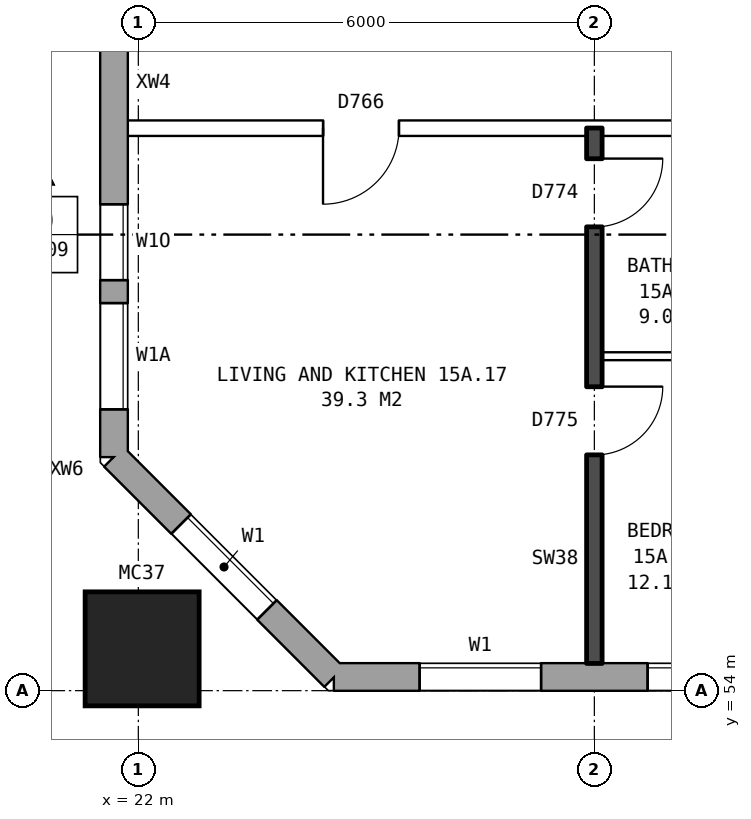
"""IFC4 building model, lengths in metres.
Left out: names, types, materials, properties, quantities, classifications, styles, units other than length and angle.
Written with IfcOpenShell. Run it as: python <this file> out.ifc"""

import sys

from ifc_helpers import new_model, si_unit, direction, frame, frame_2d, origin, origin_2d, place, context, subcontext, project, spatial, rectangle, hollow_rectangle, extrude, element, fill, save


model = new_model("IFC4")
c1 = context("Model", 3, precision=1e-05, world=origin(), true_north=direction((0.0, 1.0)))
c2 = subcontext(c1, "Body", "Model", "MODEL_VIEW")
j1 = project(units=[si_unit("LENGTHUNIT", "METRE"), si_unit("PLANEANGLEUNIT", "RADIAN")], contexts=[c1])
p1 = place(None, origin())
s1 = spatial("IfcSite", under=j1, at=p1, CompositionType="ELEMENT")
p2 = place(p1, origin())
s2 = spatial("IfcBuilding", under=s1, at=p2, CompositionType="ELEMENT")
p3 = place(p2, frame((0.0, 0.0, 56.7)))
s3 = spatial("IfcBuildingStorey", under=s2, at=p3, CompositionType="ELEMENT", Elevation=56.7)
p4 = place(p3, frame((22.05, 54.55, 0.0), z_axis=(0.0, 0.0, 1.0), x_axis=(1.0, 0.0, 0.0)))
e1 = element("IfcColumn", 1, at=p4, inside=s3, PredefinedType="COLUMN", context=c2, shape_type="SweptSolid", body=[
    extrude(hollow_rectangle(XDim=1.5, YDim=1.5, WallThickness=0.08, at=origin_2d()), origin(), (0.0, 0.0, 1.0), 3.1),
])
p5 = place(p3, frame((21.68, 57.075, 0.0), z_axis=(0.0, 0.0, 1.0), x_axis=(0.707106781187, -0.707106781187, 0.0)))
e2 = element("IfcWall", 2, at=p5, inside=s3, PredefinedType="STANDARD", context=c2, shape_type="SweptSolid", body=[
    extrude(rectangle(XDim=4.094, YDim=0.36, at=frame_2d((2.047, 0.0))), origin(), (0.0, 0.0, 1.0), 2.85),
])
p6 = place(p5, frame((1.247, 0.0, 0.8)))
e3 = element("IfcOpeningElement", 3, at=p6, cuts=e2, PredefinedType="OPENING", context=c2, shape_type="SweptSolid", body=[
    extrude(rectangle(XDim=1.6, YDim=1.8, at=frame_2d((0.8, 0.9))), frame((0.0, 0.19, 0.0), z_axis=(0.0, -1.0, 0.0), x_axis=(1.0, 0.0, 0.0)), (0.0, 0.0, 1.0), 0.38),
])
p7 = place(p3, frame((24.575, 54.18, 0.0), z_axis=(0.0, 0.0, 1.0), x_axis=(1.0, 0.0, 0.0)))
e4 = element("IfcWall", 4, at=p7, inside=s3, PredefinedType="STANDARD", context=c2, shape_type="SweptSolid", body=[
    extrude(rectangle(XDim=48.351, YDim=0.36, at=frame_2d((24.175, 0.0))), origin(), (0.0, 0.0, 1.0), 2.85),
])
p8 = place(p7, frame((1.125, 0.0, 0.8)))
e5 = element("IfcOpeningElement", 5, at=p8, cuts=e4, PredefinedType="OPENING", context=c2, shape_type="SweptSolid", body=[
    extrude(rectangle(XDim=1.6, YDim=1.8, at=frame_2d((0.8, 0.9))), frame((0.0, 0.19, 0.0), z_axis=(0.0, -1.0, 0.0), x_axis=(1.0, 0.0, 0.0)), (0.0, 0.0, 1.0), 0.38),
])
p9 = place(p7, frame((4.125, 0.0, 0.8)))
e6 = element("IfcOpeningElement", 6, at=p9, cuts=e4, PredefinedType="OPENING", context=c2, shape_type="SweptSolid", body=[
    extrude(rectangle(XDim=1.6, YDim=1.8, at=frame_2d((0.8, 0.9))), frame((0.0, 0.19, 0.0), z_axis=(0.0, -1.0, 0.0), x_axis=(1.0, 0.0, 0.0)), (0.0, 0.0, 1.0), 0.38),
])
p10 = place(p7, frame((7.125, 0.0, 0.8)))
e7 = element("IfcOpeningElement", 7, at=p10, cuts=e4, PredefinedType="OPENING", context=c2, shape_type="SweptSolid", body=[
    extrude(rectangle(XDim=1.6, YDim=1.8, at=frame_2d((0.8, 0.9))), frame((0.0, 0.19, 0.0), z_axis=(0.0, -1.0, 0.0), x_axis=(1.0, 0.0, 0.0)), (0.0, 0.0, 1.0), 0.38),
])
p11 = place(p7, frame((10.125, 0.0, 0.8)))
e8 = element("IfcOpeningElement", 8, at=p11, cuts=e4, PredefinedType="OPENING", context=c2, shape_type="SweptSolid", body=[
    extrude(rectangle(XDim=1.6, YDim=1.8, at=frame_2d((0.8, 0.9))), frame((0.0, 0.19, 0.0), z_axis=(0.0, -1.0, 0.0), x_axis=(1.0, 0.0, 0.0)), (0.0, 0.0, 1.0), 0.38),
])
p12 = place(p7, frame((13.125, 0.0, 0.8)))
e9 = element("IfcOpeningElement", 9, at=p12, cuts=e4, PredefinedType="OPENING", context=c2, shape_type="SweptSolid", body=[
    extrude(rectangle(XDim=1.6, YDim=1.8, at=frame_2d((0.8, 0.9))), frame((0.0, 0.19, 0.0), z_axis=(0.0, -1.0, 0.0), x_axis=(1.0, 0.0, 0.0)), (0.0, 0.0, 1.0), 0.38),
])
p13 = place(p7, frame((15.625, 0.0, 1.0)))
e10 = element("IfcOpeningElement", 10, at=p13, cuts=e4, PredefinedType="OPENING", context=c2, shape_type="SweptSolid", body=[
    extrude(rectangle(XDim=0.8, YDim=1.5, at=frame_2d((0.4, 0.75))), frame((0.0, 0.19, 0.0), z_axis=(0.0, -1.0, 0.0), x_axis=(1.0, 0.0, 0.0)), (0.0, 0.0, 1.0), 0.38),
])
p14 = place(p7, frame((16.725, 0.0, 1.6)))
e11 = element("IfcOpeningElement", 11, at=p14, cuts=e4, PredefinedType="OPENING", context=c2, shape_type="SweptSolid", body=[
    extrude(rectangle(XDim=0.6, YDim=0.9, at=frame_2d((0.3, 0.45))), frame((0.0, 0.19, 0.0), z_axis=(0.0, -1.0, 0.0), x_axis=(1.0, 0.0, 0.0)), (0.0, 0.0, 1.0), 0.38),
])
p15 = place(p7, frame((22.125, 0.0, 0.8)))
e12 = element("IfcOpeningElement", 12, at=p15, cuts=e4, PredefinedType="OPENING", context=c2, shape_type="SweptSolid", body=[
    extrude(rectangle(XDim=1.6, YDim=1.8, at=frame_2d((0.8, 0.9))), frame((0.0, 0.19, 0.0), z_axis=(0.0, -1.0, 0.0), x_axis=(1.0, 0.0, 0.0)), (0.0, 0.0, 1.0), 0.38),
])
p16 = place(p7, frame((25.125, 0.0, 0.8)))
e13 = element("IfcOpeningElement", 13, at=p16, cuts=e4, PredefinedType="OPENING", context=c2, shape_type="SweptSolid", body=[
    extrude(rectangle(XDim=1.6, YDim=1.8, at=frame_2d((0.8, 0.9))), frame((0.0, 0.19, 0.0), z_axis=(0.0, -1.0, 0.0), x_axis=(1.0, 0.0, 0.0)), (0.0, 0.0, 1.0), 0.38),
])
p17 = place(p7, frame((27.625, 0.0, 0.35)))
e14 = element("IfcOpeningElement", 14, at=p17, cuts=e4, PredefinedType="OPENING", context=c2, shape_type="SweptSolid", body=[
    extrude(rectangle(XDim=1.2, YDim=1.8, at=frame_2d((0.6, 0.9))), frame((0.0, 0.19, 0.0), z_axis=(0.0, -1.0, 0.0), x_axis=(1.0, 0.0, 0.0)), (0.0, 0.0, 1.0), 0.38),
])
p18 = place(p7, frame((30.875, 0.0, 1.7)))
e15 = element("IfcOpeningElement", 15, at=p18, cuts=e4, PredefinedType="OPENING", context=c2, shape_type="SweptSolid", body=[
    extrude(rectangle(XDim=1.0, YDim=0.9, at=frame_2d((0.5, 0.45))), frame((0.0, 0.19, 0.0), z_axis=(0.0, -1.0, 0.0), x_axis=(1.0, 0.0, 0.0)), (0.0, 0.0, 1.0), 0.38),
])
p19 = place(p7, frame((34.125, 0.0, 0.8)))
e16 = element("IfcOpeningElement", 16, at=p19, cuts=e4, PredefinedType="OPENING", context=c2, shape_type="SweptSolid", body=[
    extrude(rectangle(XDim=1.6, YDim=1.8, at=frame_2d((0.8, 0.9))), frame((0.0, 0.19, 0.0), z_axis=(0.0, -1.0, 0.0), x_axis=(1.0, 0.0, 0.0)), (0.0, 0.0, 1.0), 0.38),
])
p20 = place(p7, frame((37.125, 0.0, 0.8)))
e17 = element("IfcOpeningElement", 17, at=p20, cuts=e4, PredefinedType="OPENING", context=c2, shape_type="SweptSolid", body=[
    extrude(rectangle(XDim=1.6, YDim=1.8, at=frame_2d((0.8, 0.9))), frame((0.0, 0.19, 0.0), z_axis=(0.0, -1.0, 0.0), x_axis=(1.0, 0.0, 0.0)), (0.0, 0.0, 1.0), 0.38),
])
p21 = place(p7, frame((40.125, 0.0, 0.8)))
e18 = element("IfcOpeningElement", 18, at=p21, cuts=e4, PredefinedType="OPENING", context=c2, shape_type="SweptSolid", body=[
    extrude(rectangle(XDim=1.6, YDim=1.8, at=frame_2d((0.8, 0.9))), frame((0.0, 0.19, 0.0), z_axis=(0.0, -1.0, 0.0), x_axis=(1.0, 0.0, 0.0)), (0.0, 0.0, 1.0), 0.38),
])
p22 = place(p7, frame((43.125, 0.0, 0.8)))
e19 = element("IfcOpeningElement", 19, at=p22, cuts=e4, PredefinedType="OPENING", context=c2, shape_type="SweptSolid", body=[
    extrude(rectangle(XDim=1.6, YDim=1.8, at=frame_2d((0.8, 0.9))), frame((0.0, 0.19, 0.0), z_axis=(0.0, -1.0, 0.0), x_axis=(1.0, 0.0, 0.0)), (0.0, 0.0, 1.0), 0.38),
])
p23 = place(p7, frame((46.125, 0.0, 0.8)))
e20 = element("IfcOpeningElement", 20, at=p23, cuts=e4, PredefinedType="OPENING", context=c2, shape_type="SweptSolid", body=[
    extrude(rectangle(XDim=1.6, YDim=1.8, at=frame_2d((0.8, 0.9))), frame((0.0, 0.19, 0.0), z_axis=(0.0, -1.0, 0.0), x_axis=(1.0, 0.0, 0.0)), (0.0, 0.0, 1.0), 0.38),
])
p24 = place(p7, frame((18.875, 0.0, 0.8)))
e21 = element("IfcOpeningElement", 21, at=p24, cuts=e4, PredefinedType="OPENING", context=c2, shape_type="SweptSolid", body=[
    extrude(rectangle(XDim=1.0, YDim=0.9, at=frame_2d((0.5, 0.45))), frame((0.0, 0.19, 0.0), z_axis=(0.0, -1.0, 0.0), x_axis=(1.0, 0.0, 0.0)), (0.0, 0.0, 1.0), 0.38),
])
p25 = place(p7, frame((20.175, 0.0, 0.8)))
e22 = element("IfcOpeningElement", 22, at=p25, cuts=e4, PredefinedType="OPENING", context=c2, shape_type="SweptSolid", body=[
    extrude(rectangle(XDim=1.0, YDim=1.8, at=frame_2d((0.5, 0.9))), frame((0.0, 0.19, 0.0), z_axis=(0.0, -1.0, 0.0), x_axis=(1.0, 0.0, 0.0)), (0.0, 0.0, 1.0), 0.38),
])
p26 = place(p7, frame((29.125, 0.0, 0.35)))
e23 = element("IfcOpeningElement", 23, at=p26, cuts=e4, PredefinedType="OPENING", context=c2, shape_type="SweptSolid", body=[
    extrude(rectangle(XDim=1.0, YDim=0.9, at=frame_2d((0.5, 0.45))), frame((0.0, 0.19, 0.0), z_axis=(0.0, -1.0, 0.0), x_axis=(1.0, 0.0, 0.0)), (0.0, 0.0, 1.0), 0.38),
])
p27 = place(p7, frame((32.225, 0.0, 0.8)))
e24 = element("IfcOpeningElement", 24, at=p27, cuts=e4, PredefinedType="OPENING", context=c2, shape_type="SweptSolid", body=[
    extrude(rectangle(XDim=1.0, YDim=1.8, at=frame_2d((0.5, 0.9))), frame((0.0, 0.19, 0.0), z_axis=(0.0, -1.0, 0.0), x_axis=(1.0, 0.0, 0.0)), (0.0, 0.0, 1.0), 0.38),
])
p28 = place(p3, frame((21.68, 82.925, 0.0), z_axis=(0.0, 0.0, 1.0), x_axis=(0.0, -1.0, 0.0)))
e25 = element("IfcWall", 25, at=p28, inside=s3, PredefinedType="STANDARD", context=c2, shape_type="SweptSolid", body=[
    extrude(rectangle(XDim=25.851, YDim=0.36, at=frame_2d((12.925, 0.0))), origin(), (0.0, 0.0, 1.0), 2.85),
])
p29 = place(p28, frame((0.725, 0.0, 0.8)))
e26 = element("IfcOpeningElement", 26, at=p29, cuts=e25, PredefinedType="OPENING", context=c2, shape_type="SweptSolid", body=[
    extrude(rectangle(XDim=1.6, YDim=1.8, at=frame_2d((0.8, 0.9))), frame((0.0, 0.19, 0.0), z_axis=(0.0, -1.0, 0.0), x_axis=(1.0, 0.0, 0.0)), (0.0, 0.0, 1.0), 0.38),
])
p30 = place(p28, frame((5.525, 0.0, 1.4)))
e27 = element("IfcOpeningElement", 27, at=p30, cuts=e25, PredefinedType="OPENING", context=c2, shape_type="SweptSolid", body=[
    extrude(rectangle(XDim=1.6, YDim=1.2, at=frame_2d((0.8, 0.6))), frame((0.0, 0.19, 0.0), z_axis=(0.0, -1.0, 0.0), x_axis=(1.0, 0.0, 0.0)), (0.0, 0.0, 1.0), 0.38),
])
p31 = place(p28, frame((7.625, 0.0, 0.8)))
e28 = element("IfcOpeningElement", 28, at=p31, cuts=e25, PredefinedType="OPENING", context=c2, shape_type="SweptSolid", body=[
    extrude(rectangle(XDim=1.6, YDim=1.8, at=frame_2d((0.8, 0.9))), frame((0.0, 0.19, 0.0), z_axis=(0.0, -1.0, 0.0), x_axis=(1.0, 0.0, 0.0)), (0.0, 0.0, 1.0), 0.38),
])
p32 = place(p28, frame((10.625, 0.0, 0.8)))
e29 = element("IfcOpeningElement", 29, at=p32, cuts=e25, PredefinedType="OPENING", context=c2, shape_type="SweptSolid", body=[
    extrude(rectangle(XDim=1.6, YDim=1.8, at=frame_2d((0.8, 0.9))), frame((0.0, 0.19, 0.0), z_axis=(0.0, -1.0, 0.0), x_axis=(1.0, 0.0, 0.0)), (0.0, 0.0, 1.0), 0.38),
])
p33 = place(p28, frame((13.625, 0.0, 0.8)))
e30 = element("IfcOpeningElement", 30, at=p33, cuts=e25, PredefinedType="OPENING", context=c2, shape_type="SweptSolid", body=[
    extrude(rectangle(XDim=1.6, YDim=1.8, at=frame_2d((0.8, 0.9))), frame((0.0, 0.19, 0.0), z_axis=(0.0, -1.0, 0.0), x_axis=(1.0, 0.0, 0.0)), (0.0, 0.0, 1.0), 0.38),
])
p34 = place(p28, frame((16.625, 0.0, 0.8)))
e31 = element("IfcOpeningElement", 31, at=p34, cuts=e25, PredefinedType="OPENING", context=c2, shape_type="SweptSolid", body=[
    extrude(rectangle(XDim=1.6, YDim=1.8, at=frame_2d((0.8, 0.9))), frame((0.0, 0.19, 0.0), z_axis=(0.0, -1.0, 0.0), x_axis=(1.0, 0.0, 0.0)), (0.0, 0.0, 1.0), 0.38),
])
p35 = place(p28, frame((9.525, 0.0, 0.8)))
e32 = element("IfcOpeningElement", 32, at=p35, cuts=e25, PredefinedType="OPENING", context=c2, shape_type="SweptSolid", body=[
    extrude(rectangle(XDim=0.8, YDim=1.8, at=frame_2d((0.4, 0.9))), frame((0.0, 0.19, 0.0), z_axis=(0.0, -1.0, 0.0), x_axis=(1.0, 0.0, 0.0)), (0.0, 0.0, 1.0), 0.38),
])
p36 = place(p28, frame((22.525, 0.0, 0.8)))
e33 = element("IfcOpeningElement", 33, at=p36, cuts=e25, PredefinedType="OPENING", context=c2, shape_type="SweptSolid", body=[
    extrude(rectangle(XDim=1.0, YDim=1.2, at=frame_2d((0.5, 0.6))), frame((0.0, 0.19, 0.0), z_axis=(0.0, -1.0, 0.0), x_axis=(1.0, 0.0, 0.0)), (0.0, 0.0, 1.0), 0.38),
])
p37 = place(p28, frame((2.625, 0.0, 0.8)))
e34 = element("IfcOpeningElement", 34, at=p37, cuts=e25, PredefinedType="OPENING", context=c2, shape_type="SweptSolid", body=[
    extrude(rectangle(XDim=0.6, YDim=1.2, at=frame_2d((0.3, 0.6))), frame((0.0, 0.19, 0.0), z_axis=(0.0, -1.0, 0.0), x_axis=(1.0, 0.0, 0.0)), (0.0, 0.0, 1.0), 0.38),
])
p38 = place(p28, frame((12.525, 0.0, 0.8)))
e35 = element("IfcOpeningElement", 35, at=p38, cuts=e25, PredefinedType="OPENING", context=c2, shape_type="SweptSolid", body=[
    extrude(rectangle(XDim=0.8, YDim=1.8, at=frame_2d((0.4, 0.9))), frame((0.0, 0.19, 0.0), z_axis=(0.0, -1.0, 0.0), x_axis=(1.0, 0.0, 0.0)), (0.0, 0.0, 1.0), 0.38),
])
p39 = place(p28, frame((15.525, 0.0, 0.8)))
e36 = element("IfcOpeningElement", 36, at=p39, cuts=e25, PredefinedType="OPENING", context=c2, shape_type="SweptSolid", body=[
    extrude(rectangle(XDim=0.8, YDim=1.8, at=frame_2d((0.4, 0.9))), frame((0.0, 0.19, 0.0), z_axis=(0.0, -1.0, 0.0), x_axis=(1.0, 0.0, 0.0)), (0.0, 0.0, 1.0), 0.38),
])
p40 = place(p28, frame((18.525, 0.0, 0.9)))
e37 = element("IfcOpeningElement", 37, at=p40, cuts=e25, PredefinedType="OPENING", context=c2, shape_type="SweptSolid", body=[
    extrude(rectangle(XDim=0.8, YDim=1.5, at=frame_2d((0.4, 0.75))), frame((0.0, 0.19, 0.0), z_axis=(0.0, -1.0, 0.0), x_axis=(1.0, 0.0, 0.0)), (0.0, 0.0, 1.0), 0.38),
])
p41 = place(p28, frame((23.825, 0.0, 0.8)))
e38 = element("IfcOpeningElement", 38, at=p41, cuts=e25, PredefinedType="OPENING", context=c2, shape_type="SweptSolid", body=[
    extrude(rectangle(XDim=1.4, YDim=1.8, at=frame_2d((0.7, 0.9))), frame((0.0, 0.19, 0.0), z_axis=(0.0, -1.0, 0.0), x_axis=(1.0, 0.0, 0.0)), (0.0, 0.0, 1.0), 0.38),
])
p42 = place(p3, frame((28.1, 58.4, 0.0), z_axis=(0.0, 0.0, 1.0), x_axis=(1.0, 0.0, 0.0)))
e39 = element("IfcWall", 39, at=p42, inside=s3, PredefinedType="PARTITIONING", context=c2, shape_type="SweptSolid", body=[
    extrude(rectangle(XDim=2.8, YDim=0.1, at=frame_2d((1.4, 0.0))), origin(), (0.0, 0.0, 1.0), 2.85),
])
p43 = place(p3, frame((21.86, 61.4, 0.0), z_axis=(0.0, 0.0, 1.0), x_axis=(1.0, 0.0, 0.0)))
e40 = element("IfcWall", 40, at=p43, inside=s3, PredefinedType="PARTITIONING", context=c2, shape_type="SweptSolid", body=[
    extrude(rectangle(XDim=24.04, YDim=0.2, at=frame_2d((12.02, 0.0))), origin(), (0.0, 0.0, 1.0), 2.85),
])
p44 = place(p43, frame((19.44, 0.0, 0.0)))
e41 = element("IfcOpeningElement", 41, at=p44, cuts=e40, PredefinedType="OPENING", context=c2, shape_type="SweptSolid", body=[
    extrude(rectangle(XDim=1.0, YDim=2.1, at=frame_2d((0.5, 1.05))), frame((0.0, 0.11, 0.0), z_axis=(0.0, -1.0, 0.0), x_axis=(1.0, 0.0, 0.0)), (0.0, 0.0, 1.0), 0.22),
])
p45 = place(p43, frame((14.64, 0.0, 0.0)))
e42 = element("IfcOpeningElement", 42, at=p45, cuts=e40, PredefinedType="OPENING", context=c2, shape_type="SweptSolid", body=[
    extrude(rectangle(XDim=1.0, YDim=2.1, at=frame_2d((0.5, 1.05))), frame((0.0, 0.11, 0.0), z_axis=(0.0, -1.0, 0.0), x_axis=(1.0, 0.0, 0.0)), (0.0, 0.0, 1.0), 0.22),
])
p46 = place(p43, frame((2.57, 0.0, 0.0)))
e43 = element("IfcOpeningElement", 43, at=p46, cuts=e40, PredefinedType="OPENING", context=c2, shape_type="SweptSolid", body=[
    extrude(rectangle(XDim=1.0, YDim=2.1, at=frame_2d((0.5, 1.05))), frame((0.0, 0.11, 0.0), z_axis=(0.0, -1.0, 0.0), x_axis=(1.0, 0.0, 0.0)), (0.0, 0.0, 1.0), 0.22),
])
p47 = place(p3, frame((28.0, 54.36, 0.0), z_axis=(0.0, 0.0, 1.0), x_axis=(0.0, 1.0, 0.0)))
e44 = element("IfcWall", 44, at=p47, inside=s3, PredefinedType="SOLIDWALL", context=c2, shape_type="SweptSolid", body=[
    extrude(rectangle(XDim=7.04, YDim=0.2, at=frame_2d((3.52, 0.0))), origin(), (0.0, 0.0, 1.0), 2.85),
])
p48 = place(p47, frame((2.74, 0.0, 0.0)))
e45 = element("IfcOpeningElement", 45, at=p48, cuts=e44, PredefinedType="OPENING", context=c2, shape_type="SweptSolid", body=[
    extrude(rectangle(XDim=0.9, YDim=2.1, at=frame_2d((0.45, 1.05))), frame((0.0, 0.11, 0.0), z_axis=(0.0, -1.0, 0.0), x_axis=(1.0, 0.0, 0.0)), (0.0, 0.0, 1.0), 0.22),
])
p49 = place(p47, frame((5.74, 0.0, 0.0)))
e46 = element("IfcOpeningElement", 46, at=p49, cuts=e44, PredefinedType="OPENING", context=c2, shape_type="SweptSolid", body=[
    extrude(rectangle(XDim=0.9, YDim=2.1, at=frame_2d((0.45, 1.05))), frame((0.0, 0.11, 0.0), z_axis=(0.0, -1.0, 0.0), x_axis=(1.0, 0.0, 0.0)), (0.0, 0.0, 1.0), 0.22),
])
p50 = place(p6, origin())
e47 = element("IfcWindow", 47, at=p50, inside=s3, PartitioningType="SINGLE_PANEL", PredefinedType="WINDOW", context=c2, shape_type="SweptSolid", body=[
    extrude(rectangle(XDim=1.6, YDim=1.8, at=frame_2d((0.8, 0.9))), frame((0.0, 0.15, 0.0), z_axis=(0.0, -1.0, 0.0), x_axis=(1.0, 0.0, 0.0)), (0.0, 0.0, 1.0), 0.06),
])
fill(e3, e47)
p51 = place(p8, origin())
e48 = element("IfcWindow", 48, at=p51, inside=s3, PartitioningType="SINGLE_PANEL", PredefinedType="WINDOW", context=c2, shape_type="SweptSolid", body=[
    extrude(rectangle(XDim=1.6, YDim=1.8, at=frame_2d((0.8, 0.9))), frame((0.0, 0.15, 0.0), z_axis=(0.0, -1.0, 0.0), x_axis=(1.0, 0.0, 0.0)), (0.0, 0.0, 1.0), 0.06),
])
fill(e5, e48)
p52 = place(p9, origin())
e49 = element("IfcWindow", 49, at=p52, inside=s3, PartitioningType="SINGLE_PANEL", PredefinedType="WINDOW", context=c2, shape_type="SweptSolid", body=[
    extrude(rectangle(XDim=1.6, YDim=1.8, at=frame_2d((0.8, 0.9))), frame((0.0, 0.15, 0.0), z_axis=(0.0, -1.0, 0.0), x_axis=(1.0, 0.0, 0.0)), (0.0, 0.0, 1.0), 0.06),
])
fill(e6, e49)
p53 = place(p36, origin())
e50 = element("IfcWindow", 50, at=p53, inside=s3, PartitioningType="SINGLE_PANEL", PredefinedType="WINDOW", context=c2, shape_type="SweptSolid", body=[
    extrude(rectangle(XDim=1.0, YDim=1.2, at=frame_2d((0.5, 0.6))), frame((0.0, 0.15, 0.0), z_axis=(0.0, -1.0, 0.0), x_axis=(1.0, 0.0, 0.0)), (0.0, 0.0, 1.0), 0.06),
])
fill(e33, e50)
p54 = place(p48, frame((0.9, 0.0, 0.0), z_axis=(0.0, 0.0, 1.0), x_axis=(-1.0, 0.0, 0.0)))
e51 = element("IfcDoor", 51, at=p54, inside=s3, OperationType="SINGLE_SWING_LEFT", PredefinedType="DOOR", context=c2, shape_type="SweptSolid", body=[
    extrude(rectangle(XDim=0.9, YDim=2.1, at=frame_2d((0.45, 1.05))), frame((0.0, 0.025, 0.0), z_axis=(0.0, -1.0, 0.0), x_axis=(1.0, 0.0, 0.0)), (0.0, 0.0, 1.0), 0.05),
])
fill(e45, e51)
p55 = place(p46, frame((1.0, 0.0, 0.0), z_axis=(0.0, 0.0, 1.0), x_axis=(-1.0, 0.0, 0.0)))
e52 = element("IfcDoor", 52, at=p55, inside=s3, OperationType="SINGLE_SWING_RIGHT", PredefinedType="DOOR", context=c2, shape_type="SweptSolid", body=[
    extrude(rectangle(XDim=1.0, YDim=2.1, at=frame_2d((0.5, 1.05))), frame((0.0, 0.025, 0.0), z_axis=(0.0, -1.0, 0.0), x_axis=(1.0, 0.0, 0.0)), (0.0, 0.0, 1.0), 0.05),
])
fill(e43, e52)
p56 = place(p49, frame((0.9, 0.0, 0.0), z_axis=(0.0, 0.0, 1.0), x_axis=(-1.0, 0.0, 0.0)))
e53 = element("IfcDoor", 53, at=p56, inside=s3, OperationType="SINGLE_SWING_LEFT", PredefinedType="DOOR", context=c2, shape_type="SweptSolid", body=[
    extrude(rectangle(XDim=0.9, YDim=2.1, at=frame_2d((0.45, 1.05))), frame((0.0, 0.025, 0.0), z_axis=(0.0, -1.0, 0.0), x_axis=(1.0, 0.0, 0.0)), (0.0, 0.0, 1.0), 0.05),
])
fill(e46, e53)
p57 = place(p41, origin())
e54 = element("IfcWindow", 54, at=p57, inside=s3, PartitioningType="SINGLE_PANEL", PredefinedType="WINDOW", context=c2, shape_type="SweptSolid", body=[
    extrude(rectangle(XDim=1.4, YDim=1.8, at=frame_2d((0.7, 0.9))), frame((0.0, 0.15, 0.0), z_axis=(0.0, -1.0, 0.0), x_axis=(1.0, 0.0, 0.0)), (0.0, 0.0, 1.0), 0.06),
])
fill(e38, e54)
save(model, sys.argv[1])
